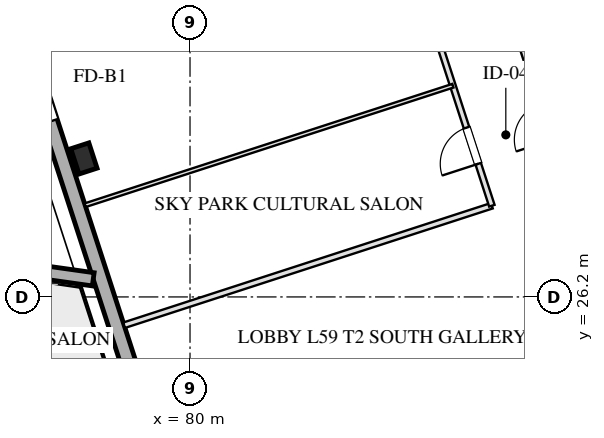
"""IFC4 building model, lengths in metres.
Left out: names, types, materials, properties, quantities, classifications, styles, units other than length and angle.
Written with IfcOpenShell. Run it as: python <this file> out.ifc"""

import sys

from ifc_helpers import new_model, si_unit, direction, frame, frame_2d, origin, origin_2d, place, context, subcontext, project, spatial, rectangle, hollow_rectangle, extrude, element, fill, save


model = new_model("IFC4")
c1 = context("Model", 3, precision=1e-05, world=origin(), true_north=direction((0.0, 1.0)))
c2 = subcontext(c1, "Body", "Model", "MODEL_VIEW")
j1 = project(units=[si_unit("LENGTHUNIT", "METRE"), si_unit("PLANEANGLEUNIT", "RADIAN")], contexts=[c1])
p1 = place(None, origin())
s1 = spatial("IfcSite", under=j1, at=p1, CompositionType="ELEMENT")
p2 = place(p1, origin())
s2 = spatial("IfcBuilding", under=s1, at=p2, CompositionType="ELEMENT")
p3 = place(p2, frame((0.0, 0.0, 219.65)))
s3 = spatial("IfcBuildingStorey", under=s2, at=p3, CompositionType="ELEMENT", Elevation=219.65)
p4 = place(p3, frame((77.208, 29.844, 0.0), z_axis=(0.0, 0.0, 1.0), x_axis=(0.951056516295, 0.309016994375, 0.0)))
e1 = element("IfcColumn", 1, at=p4, inside=s3, PredefinedType="COLUMN", context=c2, shape_type="SweptSolid", body=[
    extrude(hollow_rectangle(XDim=0.5, YDim=0.7, WallThickness=0.025, at=origin_2d()), origin(), (0.0, 0.0, 1.0), 3.451),
])
p5 = place(p3, frame((82.618, 11.414, 0.0), z_axis=(0.0, 0.0, 1.0), x_axis=(-0.309016491071, 0.951056679828, 0.0)))
e2 = element("IfcWall", 2, at=p5, inside=s3, PredefinedType="SOLIDWALL", context=c2, shape_type="SweptSolid", body=[
    extrude(rectangle(XDim=38.4, YDim=0.4, at=frame_2d((19.2, 0.0))), origin(), (0.0, 0.0, 1.0), 2.61),
])
p6 = place(p5, frame((20.4, 0.0, 0.0)))
e3 = element("IfcOpeningElement", 3, at=p6, cuts=e2, PredefinedType="OPENING", context=c2, shape_type="SweptSolid", body=[
    extrude(rectangle(XDim=1.8, YDim=2.2, at=frame_2d((0.9, 1.1))), frame((0.0, 0.21, 0.0), z_axis=(0.0, -1.0, 0.0), x_axis=(1.0, 0.0, 0.0)), (0.0, 0.0, 1.0), 0.42),
])
p7 = place(p3, frame((77.453, 26.664, 0.0), z_axis=(0.0, 0.0, 1.0), x_axis=(-0.990242401523, 0.13935561067, 0.0)))
e4 = element("IfcWall", 4, at=p7, inside=s3, PredefinedType="SOLIDWALL", context=c2, shape_type="SweptSolid", body=[
    extrude(rectangle(XDim=30.399, YDim=0.35, at=frame_2d((15.2, 0.0))), origin(), (0.0, 0.0, 1.0), 3.4),
])
p8 = place(p7, frame((6.5, 0.0, 0.0)))
e5 = element("IfcOpeningElement", 5, at=p8, cuts=e4, PredefinedType="OPENING", context=c2, shape_type="SweptSolid", body=[
    extrude(rectangle(XDim=1.1, YDim=2.15, at=frame_2d((0.55, 1.075))), frame((0.0, 0.185, 0.0), z_axis=(0.0, -1.0, 0.0), x_axis=(1.0, 0.0, 0.0)), (0.0, 0.0, 1.0), 0.37),
])
p9 = place(p3, frame((78.266, 25.456, 0.0), z_axis=(0.0, 0.0, 1.0), x_axis=(0.951055402118, 0.30902042344, 0.0)))
e6 = element("IfcWall", 6, at=p9, inside=s3, PredefinedType="PARTITIONING", context=c2, shape_type="SweptSolid", body=[
    extrude(rectangle(XDim=10.175, YDim=0.15, at=frame_2d((5.087, 0.0))), origin(), (0.0, 0.0, 1.0), 3.175),
])
p10 = place(p3, frame((87.943, 28.6, 0.0), z_axis=(0.0, 0.0, 1.0), x_axis=(-0.309024734286, 0.951054001411, 0.0)))
e7 = element("IfcWall", 7, at=p10, inside=s3, PredefinedType="PARTITIONING", context=c2, shape_type="SweptSolid", body=[
    extrude(rectangle(XDim=9.0, YDim=0.15, at=frame_2d((4.5, 0.0))), origin(), (0.0, 0.0, 1.0), 3.175),
])
p11 = place(p10, frame((1.16, 0.0, 0.0)))
e8 = element("IfcOpeningElement", 8, at=p11, cuts=e7, PredefinedType="OPENING", context=c2, shape_type="SweptSolid", body=[
    extrude(rectangle(XDim=1.0, YDim=2.05, at=frame_2d((0.5, 1.025))), frame((0.0, 0.085, 0.0), z_axis=(0.0, -1.0, 0.0), x_axis=(1.0, 0.0, 0.0)), (0.0, 0.0, 1.0), 0.17),
])
p12 = place(p10, frame((5.56, 0.0, 0.0)))
e9 = element("IfcOpeningElement", 9, at=p12, cuts=e7, PredefinedType="OPENING", context=c2, shape_type="SweptSolid", body=[
    extrude(rectangle(XDim=1.2, YDim=2.05, at=frame_2d((0.6, 1.025))), frame((0.0, 0.085, 0.0), z_axis=(0.0, -1.0, 0.0), x_axis=(1.0, 0.0, 0.0)), (0.0, 0.0, 1.0), 0.17),
])
p13 = place(p3, frame((89.893, 29.234, 0.0), z_axis=(0.0, 0.0, 1.0), x_axis=(-0.309008170129, 0.951059383421, 0.0)))
e10 = element("IfcWall", 10, at=p13, inside=s3, PredefinedType="PARTITIONING", context=c2, shape_type="SweptSolid", body=[
    extrude(rectangle(XDim=9.0, YDim=0.15, at=frame_2d((4.5, 0.0))), origin(), (0.0, 0.0, 1.0), 3.175),
])
p14 = place(p13, frame((1.16, 0.0, 0.0)))
e11 = element("IfcOpeningElement", 11, at=p14, cuts=e10, PredefinedType="OPENING", context=c2, shape_type="SweptSolid", body=[
    extrude(rectangle(XDim=1.0, YDim=2.05, at=frame_2d((0.5, 1.025))), frame((0.0, 0.085, 0.0), z_axis=(0.0, -1.0, 0.0), x_axis=(1.0, 0.0, 0.0)), (0.0, 0.0, 1.0), 0.17),
])
p15 = place(p13, frame((5.66, 0.0, 0.0)))
e12 = element("IfcOpeningElement", 12, at=p15, cuts=e10, PredefinedType="OPENING", context=c2, shape_type="SweptSolid", body=[
    extrude(rectangle(XDim=1.0, YDim=2.05, at=frame_2d((0.5, 1.025))), frame((0.0, 0.085, 0.0), z_axis=(0.0, -1.0, 0.0), x_axis=(1.0, 0.0, 0.0)), (0.0, 0.0, 1.0), 0.17),
])
p16 = place(p3, frame((77.24, 28.613, 0.0), z_axis=(0.0, 0.0, 1.0), x_axis=(0.951055402118, 0.30902042344, 0.0)))
e13 = element("IfcWall", 13, at=p16, inside=s3, PredefinedType="MOVABLE", context=c2, shape_type="SweptSolid", body=[
    extrude(rectangle(XDim=10.175, YDim=0.1, at=frame_2d((5.087, 0.0))), origin(), (0.0, 0.0, 1.0), 3.175),
])
p17 = place(p11, origin())
e14 = element("IfcDoor", 14, at=p17, inside=s3, OperationType="SINGLE_SWING_LEFT", PredefinedType="DOOR", context=c2, shape_type="SweptSolid", body=[
    extrude(rectangle(XDim=1.0, YDim=2.05, at=frame_2d((0.5, 1.025))), frame((0.0, 0.025, 0.0), z_axis=(0.0, -1.0, 0.0), x_axis=(1.0, 0.0, 0.0)), (0.0, 0.0, 1.0), 0.05),
])
fill(e8, e14)
save(model, sys.argv[1])
